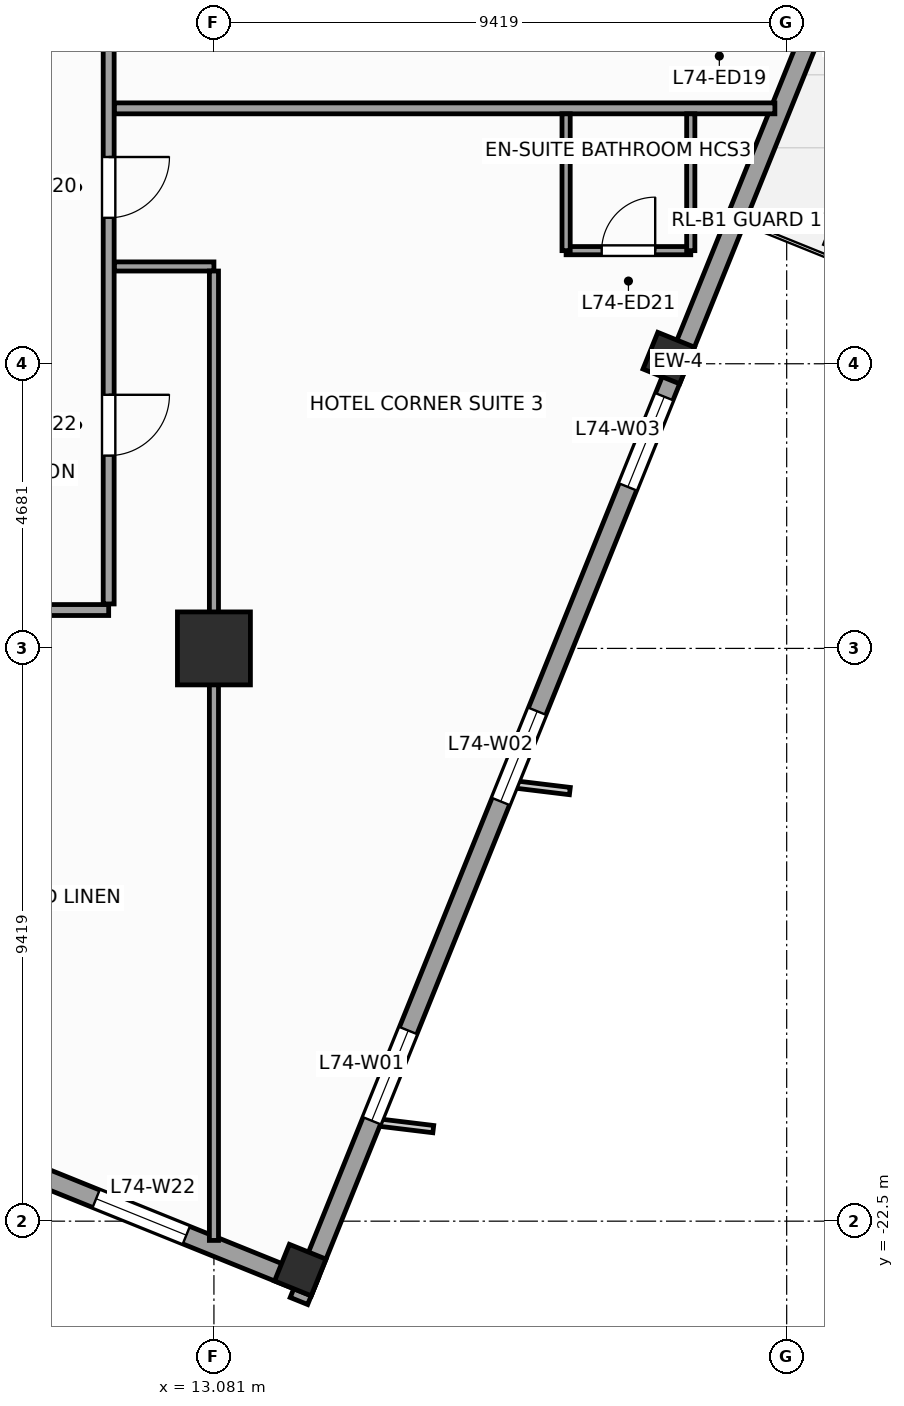
"""IFC4 building model, lengths in metres.
Left out: names, types, materials, properties, quantities, classifications, styles, units other than length and angle.
Written with IfcOpenShell. Run it as: python <this file> out.ifc"""

import sys

from ifc_helpers import new_model, si_unit, direction, frame, frame_2d, origin, origin_2d, place, context, subcontext, project, spatial, rectangle, extrude, source, transform, mapped, element, fill, save


model = new_model("IFC4")
c1 = context("Model", 3, precision=1e-05, world=origin(), true_north=direction((0.0, 1.0)))
c2 = subcontext(c1, "Body", "Model", "MODEL_VIEW")
j1 = project(units=[si_unit("LENGTHUNIT", "METRE"), si_unit("PLANEANGLEUNIT", "RADIAN")], contexts=[c1])
p1 = place(None, origin())
s1 = spatial("IfcSite", under=j1, at=p1, CompositionType="ELEMENT")
p2 = place(p1, origin())
s2 = spatial("IfcBuilding", under=s1, at=p2, CompositionType="ELEMENT")
p3 = place(p2, frame((0.0, 0.0, 301.2)))
s3 = spatial("IfcBuildingStorey", under=s2, at=p3, CompositionType="ELEMENT", Elevation=301.2)
m1 = source(origin(), c2, "Body", "SweptSolid", [
    extrude(rectangle(XDim=1.2, YDim=1.2, at=origin_2d()), origin(), (0.0, 0.0, 1.0), 3.6),
])
p4 = place(p3, frame((13.081, -13.081, 0.0), z_axis=(0.0, 0.0, 1.0), x_axis=(1.0, 0.0, 0.0)))
e1 = element("IfcColumn", 1, at=p4, inside=s3, PredefinedType="COLUMN", context=c2, shape_type="MappedRepresentation", body=[
    mapped(m1, transform((0.0, 0.0, 0.0), scale=1.0)),
])
m2 = source(origin(), c2, "Body", "SweptSolid", [
    extrude(rectangle(XDim=0.65, YDim=0.65, at=origin_2d()), origin(), (0.0, 0.0, 1.0), 3.6),
])
for number, where, z_axis, x_axis in (
    (2, (14.501, -23.304, 0.0), (0.0, 0.0, 1.0), (0.375, 0.927, 0.0)),
    (3, (20.56, -8.307, 0.0), (0.0, 0.0, 1.0), (0.375, 0.927, 0.0)),
):
    element("IfcColumn", number, at=place(p3, frame(where, z_axis=z_axis, x_axis=x_axis)), inside=s3, PredefinedType="COLUMN", context=c2, shape_type="MappedRepresentation", body=[
        mapped(m2, transform((0.0, 0.0, 0.0), scale=1.0)),
    ])
p5 = place(p3, frame((14.479, -23.813, 0.0), z_axis=(0.0, 0.0, 1.0), x_axis=(0.374609557019, 0.927182657188, 0.0)))
e4 = element("IfcWall", 4, at=p5, inside=s3, PredefinedType="STANDARD", context=c2, shape_type="SweptSolid", body=[
    extrude(rectangle(XDim=33.31, YDim=0.31, at=frame_2d((16.655, 0.0))), origin(), (0.0, 0.0, 1.0), 2.75),
])
p6 = place(p5, frame((23.08, 0.0, 0.0)))
e5 = element("IfcOpeningElement", 5, at=p6, cuts=e4, PredefinedType="OPENING", context=c2, shape_type="SweptSolid", body=[
    extrude(rectangle(XDim=1.05, YDim=2.25, at=frame_2d((0.525, 1.125))), frame((0.0, 0.165, 0.0), z_axis=(0.0, -1.0, 0.0), x_axis=(1.0, 0.0, 0.0)), (0.0, 0.0, 1.0), 0.33),
])
p7 = place(p5, frame((3.197, 0.0, 0.47)))
e6 = element("IfcOpeningElement", 6, at=p7, cuts=e4, PredefinedType="OPENING", context=c2, shape_type="SweptSolid", body=[
    extrude(rectangle(XDim=1.6, YDim=2.1, at=frame_2d((0.8, 1.05))), frame((0.0, 0.165, 0.0), z_axis=(0.0, -1.0, 0.0), x_axis=(1.0, 0.0, 0.0)), (0.0, 0.0, 1.0), 0.33),
])
p8 = place(p5, frame((8.86, 0.0, 0.47)))
e7 = element("IfcOpeningElement", 7, at=p8, cuts=e4, PredefinedType="OPENING", context=c2, shape_type="SweptSolid", body=[
    extrude(rectangle(XDim=1.6, YDim=2.1, at=frame_2d((0.8, 1.05))), frame((0.0, 0.165, 0.0), z_axis=(0.0, -1.0, 0.0), x_axis=(1.0, 0.0, 0.0)), (0.0, 0.0, 1.0), 0.33),
])
p9 = place(p5, frame((14.439, 0.0, 0.47)))
e8 = element("IfcOpeningElement", 8, at=p9, cuts=e4, PredefinedType="OPENING", context=c2, shape_type="SweptSolid", body=[
    extrude(rectangle(XDim=1.6, YDim=2.1, at=frame_2d((0.8, 1.05))), frame((0.0, 0.165, 0.0), z_axis=(0.0, -1.0, 0.0), x_axis=(1.0, 0.0, 0.0)), (0.0, 0.0, 1.0), 0.33),
])
p10 = place(p5, frame((30.097, 0.0, 0.47)))
e9 = element("IfcOpeningElement", 9, at=p10, cuts=e4, PredefinedType="OPENING", context=c2, shape_type="SweptSolid", body=[
    extrude(rectangle(XDim=1.6, YDim=2.1, at=frame_2d((0.8, 1.05))), frame((0.0, 0.165, 0.0), z_axis=(0.0, -1.0, 0.0), x_axis=(1.0, 0.0, 0.0)), (0.0, 0.0, 1.0), 0.33),
])
p11 = place(p5, frame((27.59, 0.0, 0.47)))
e10 = element("IfcOpeningElement", 10, at=p11, cuts=e4, PredefinedType="OPENING", context=c2, shape_type="SweptSolid", body=[
    extrude(rectangle(XDim=1.6, YDim=2.1, at=frame_2d((0.8, 1.05))), frame((0.0, 0.165, 0.0), z_axis=(0.0, -1.0, 0.0), x_axis=(1.0, 0.0, 0.0)), (0.0, 0.0, 1.0), 0.33),
])
p12 = place(p3, frame((9.032, -21.278, 0.0), z_axis=(0.0, 0.0, 1.0), x_axis=(0.927185411764, -0.374602739196, 0.0)))
e11 = element("IfcWall", 11, at=p12, inside=s3, PredefinedType="STANDARD", context=c2, shape_type="SweptSolid", body=[
    extrude(rectangle(XDim=6.155, YDim=0.31, at=frame_2d((3.078, 0.0))), origin(), (0.0, 0.0, 1.0), 3.35),
])
p13 = place(p12, frame((2.278, 0.0, 0.47)))
e12 = element("IfcOpeningElement", 12, at=p13, cuts=e11, PredefinedType="OPENING", context=c2, shape_type="SweptSolid", body=[
    extrude(rectangle(XDim=1.6, YDim=2.1, at=frame_2d((0.8, 1.05))), frame((0.0, 0.165, 0.0), z_axis=(0.0, -1.0, 0.0), x_axis=(1.0, 0.0, 0.0)), (0.0, 0.0, 1.0), 0.33),
])
p14 = place(p3, frame((-10.3, -12.45, 0.0), z_axis=(0.0, 0.0, 1.0), x_axis=(1.0, 0.0, 0.0)))
e13 = element("IfcWall", 13, at=p14, inside=s3, PredefinedType="PARTITIONING", context=c2, shape_type="SweptSolid", body=[
    extrude(rectangle(XDim=21.65, YDim=0.18, at=frame_2d((10.825, 0.0))), origin(), (0.0, 0.0, 1.0), 3.35),
])
p15 = place(p14, frame((14.786, 0.0, 0.0)))
e14 = element("IfcOpeningElement", 14, at=p15, cuts=e13, PredefinedType="OPENING", context=c2, shape_type="SweptSolid", body=[
    extrude(rectangle(XDim=0.95, YDim=2.1, at=frame_2d((0.475, 1.05))), frame((0.0, 0.1, 0.0), z_axis=(0.0, -1.0, 0.0), x_axis=(1.0, 0.0, 0.0)), (0.0, 0.0, 1.0), 0.2),
])
p16 = place(p14, frame((9.8, 0.0, 0.0)))
e15 = element("IfcOpeningElement", 15, at=p16, cuts=e13, PredefinedType="OPENING", context=c2, shape_type="SweptSolid", body=[
    extrude(rectangle(XDim=1.0, YDim=2.15, at=frame_2d((0.5, 1.075))), frame((0.0, 0.1, 0.0), z_axis=(0.0, -1.0, 0.0), x_axis=(1.0, 0.0, 0.0)), (0.0, 0.0, 1.0), 0.2),
])
p17 = place(p14, frame((3.064, 0.0, 0.0)))
e16 = element("IfcOpeningElement", 16, at=p17, cuts=e13, PredefinedType="OPENING", context=c2, shape_type="SweptSolid", body=[
    extrude(rectangle(XDim=1.0, YDim=2.15, at=frame_2d((0.5, 1.075))), frame((0.0, 0.1, 0.0), z_axis=(0.0, -1.0, 0.0), x_axis=(1.0, 0.0, 0.0)), (0.0, 0.0, 1.0), 0.2),
])
p18 = place(p3, frame((11.35, -12.35, 0.0), z_axis=(0.0, 0.0, 1.0), x_axis=(0.0, 1.0, 0.0)))
e17 = element("IfcWall", 17, at=p18, inside=s3, PredefinedType="PARTITIONING", context=c2, shape_type="SweptSolid", body=[
    extrude(rectangle(XDim=22.55, YDim=0.18, at=frame_2d((11.275, 0.0))), origin(), (0.0, 0.0, 1.0), 3.35),
])
p19 = place(p18, frame((17.15, 0.0, 0.0)))
e18 = element("IfcOpeningElement", 18, at=p19, cuts=e17, PredefinedType="OPENING", context=c2, shape_type="SweptSolid", body=[
    extrude(rectangle(XDim=1.0, YDim=2.15, at=frame_2d((0.5, 1.075))), frame((0.0, 0.1, 0.0), z_axis=(0.0, -1.0, 0.0), x_axis=(1.0, 0.0, 0.0)), (0.0, 0.0, 1.0), 0.2),
])
p20 = place(p18, frame((13.5, 0.0, 0.0)))
e19 = element("IfcOpeningElement", 19, at=p20, cuts=e17, PredefinedType="OPENING", context=c2, shape_type="SweptSolid", body=[
    extrude(rectangle(XDim=1.0, YDim=2.15, at=frame_2d((0.5, 1.075))), frame((0.0, 0.1, 0.0), z_axis=(0.0, -1.0, 0.0), x_axis=(1.0, 0.0, 0.0)), (0.0, 0.0, 1.0), 0.2),
])
p21 = place(p18, frame((9.5, 0.0, 0.0)))
e20 = element("IfcOpeningElement", 20, at=p21, cuts=e17, PredefinedType="OPENING", context=c2, shape_type="SweptSolid", body=[
    extrude(rectangle(XDim=1.0, YDim=2.15, at=frame_2d((0.5, 1.075))), frame((0.0, 0.1, 0.0), z_axis=(0.0, -1.0, 0.0), x_axis=(1.0, 0.0, 0.0)), (0.0, 0.0, 1.0), 0.2),
])
p22 = place(p18, frame((6.35, 0.0, 0.0)))
e21 = element("IfcOpeningElement", 21, at=p22, cuts=e17, PredefinedType="OPENING", context=c2, shape_type="SweptSolid", body=[
    extrude(rectangle(XDim=1.0, YDim=2.15, at=frame_2d((0.5, 1.075))), frame((0.0, 0.1, 0.0), z_axis=(0.0, -1.0, 0.0), x_axis=(1.0, 0.0, 0.0)), (0.0, 0.0, 1.0), 0.2),
])
p23 = place(p18, frame((2.439, 0.0, 0.0)))
e22 = element("IfcOpeningElement", 22, at=p23, cuts=e17, PredefinedType="OPENING", context=c2, shape_type="SweptSolid", body=[
    extrude(rectangle(XDim=1.0, YDim=2.15, at=frame_2d((0.5, 1.075))), frame((0.0, 0.1, 0.0), z_axis=(0.0, -1.0, 0.0), x_axis=(1.0, 0.0, 0.0)), (0.0, 0.0, 1.0), 0.2),
])
p24 = place(p3, frame((11.445, -4.2, 0.0), z_axis=(0.0, 0.0, 1.0), x_axis=(1.0, 0.0, 0.0)))
e23 = element("IfcWall", 23, at=p24, inside=s3, PredefinedType="PARTITIONING", context=c2, shape_type="SweptSolid", body=[
    extrude(rectangle(XDim=10.861, YDim=0.18, at=frame_2d((5.43, 0.0))), origin(), (0.0, 0.0, 1.0), 3.35),
])
p25 = place(p3, frame((11.445, -6.8, 0.0), z_axis=(0.0, 0.0, 1.0), x_axis=(1.0, 0.0, 0.0)))
e24 = element("IfcWall", 24, at=p25, inside=s3, PredefinedType="PARTITIONING", context=c2, shape_type="SweptSolid", body=[
    extrude(rectangle(XDim=1.636, YDim=0.15, at=frame_2d((0.818, 0.0))), origin(), (0.0, 0.0, 1.0), 3.35),
])
p26 = place(p3, frame((13.081, -6.875, 0.0), z_axis=(0.0, 0.0, 1.0), x_axis=(0.0, -1.0, 0.0)))
e25 = element("IfcWall", 25, at=p26, inside=s3, PredefinedType="PARTITIONING", context=c2, shape_type="SweptSolid", body=[
    extrude(rectangle(XDim=15.942, YDim=0.15, at=frame_2d((7.971, 0.0))), origin(), (0.0, 0.0, 1.0), 2.45),
])
p27 = place(p3, frame((18.873, -6.54, 0.0), z_axis=(0.0, 0.0, 1.0), x_axis=(1.0, 0.0, 0.0)))
e26 = element("IfcWall", 26, at=p27, inside=s3, PredefinedType="PARTITIONING", context=c2, shape_type="SweptSolid", body=[
    extrude(rectangle(XDim=2.05, YDim=0.135, at=frame_2d((1.025, 0.0))), origin(), (0.0, 0.0, 1.0), 3.35),
])
p28 = place(p27, frame((0.585, 0.0, 0.0)))
e27 = element("IfcOpeningElement", 27, at=p28, cuts=e26, PredefinedType="OPENING", context=c2, shape_type="SweptSolid", body=[
    extrude(rectangle(XDim=0.88, YDim=2.1, at=frame_2d((0.44, 1.05))), frame((0.0, 0.078, 0.0), z_axis=(0.0, -1.0, 0.0), x_axis=(1.0, 0.0, 0.0)), (0.0, 0.0, 1.0), 0.155),
])
for number, where, z_axis, x_axis in (
    (28, (20.923, -6.54, 0.0), (0.0, 0.0, 1.0), (0.0, 1.0, 0.0)),
    (29, (18.873, -6.54, 0.0), (0.0, 0.0, 1.0), (0.0, 1.0, 0.0)),
):
    element("IfcWall", number, at=place(p3, frame(where, z_axis=z_axis, x_axis=x_axis)), inside=s3, PredefinedType="PARTITIONING", context=c2, shape_type="SweptSolid", body=[
        extrude(rectangle(XDim=2.25, YDim=0.135, at=frame_2d((1.125, 0.0))), origin(), (0.0, 0.0, 1.0), 3.35),
    ])
m3 = source(origin(), c2, "Body", "SweptSolid", [
    extrude(rectangle(XDim=1.6, YDim=2.1, at=frame_2d((0.8, 1.05))), frame((0.0, 0.03, 0.0), z_axis=(0.0, -1.0, 0.0), x_axis=(1.0, 0.0, 0.0)), (0.0, 0.0, 1.0), 0.06),
])
p29 = place(p7, origin())
e30 = element("IfcWindow", 30, at=p29, inside=s3, PartitioningType="SINGLE_PANEL", PredefinedType="WINDOW", context=c2, shape_type="MappedRepresentation", body=[
    mapped(m3, transform((0.0, 0.0, 0.0), scale=1.0)),
])
fill(e6, e30)
p30 = place(p8, origin())
e31 = element("IfcWindow", 31, at=p30, inside=s3, PartitioningType="SINGLE_PANEL", PredefinedType="WINDOW", context=c2, shape_type="MappedRepresentation", body=[
    mapped(m3, transform((0.0, 0.0, 0.0), scale=1.0)),
])
fill(e7, e31)
p31 = place(p9, origin())
e32 = element("IfcWindow", 32, at=p31, inside=s3, PartitioningType="SINGLE_PANEL", PredefinedType="WINDOW", context=c2, shape_type="MappedRepresentation", body=[
    mapped(m3, transform((0.0, 0.0, 0.0), scale=1.0)),
])
fill(e8, e32)
p32 = place(p13, origin())
e33 = element("IfcWindow", 33, at=p32, inside=s3, PartitioningType="SINGLE_PANEL", PredefinedType="WINDOW", context=c2, shape_type="MappedRepresentation", body=[
    mapped(m3, transform((0.0, 0.0, 0.0), scale=1.0)),
])
fill(e12, e33)
m4 = source(origin(), c2, "Body", "SweptSolid", [
    extrude(rectangle(XDim=1.0, YDim=2.15, at=frame_2d((0.5, 1.075))), frame((0.0, 0.025, 0.0), z_axis=(0.0, -1.0, 0.0), x_axis=(1.0, 0.0, 0.0)), (0.0, 0.0, 1.0), 0.05),
])
p33 = place(p22, frame((1.0, 0.0, 0.0), z_axis=(0.0, 0.0, 1.0), x_axis=(-1.0, 0.0, 0.0)))
e34 = element("IfcDoor", 34, at=p33, inside=s3, OperationType="SINGLE_SWING_RIGHT", PredefinedType="DOOR", context=c2, shape_type="MappedRepresentation", body=[
    mapped(m4, transform((0.0, 0.0, 0.0), scale=1.0)),
])
fill(e21, e34)
m5 = source(origin(), c2, "Body", "SweptSolid", [
    extrude(rectangle(XDim=0.88, YDim=2.1, at=frame_2d((0.44, 1.05))), frame((0.0, 0.025, 0.0), z_axis=(0.0, -1.0, 0.0), x_axis=(1.0, 0.0, 0.0)), (0.0, 0.0, 1.0), 0.05),
])
p34 = place(p28, origin())
e35 = element("IfcDoor", 35, at=p34, inside=s3, OperationType="SINGLE_SWING_RIGHT", PredefinedType="DOOR", context=c2, shape_type="MappedRepresentation", body=[
    mapped(m5, transform((0.0, 0.0, 0.0), scale=1.0)),
])
fill(e27, e35)
p35 = place(p23, frame((1.0, 0.0, 0.0), z_axis=(0.0, 0.0, 1.0), x_axis=(-1.0, 0.0, 0.0)))
e36 = element("IfcDoor", 36, at=p35, inside=s3, OperationType="SINGLE_SWING_RIGHT", PredefinedType="DOOR", context=c2, shape_type="MappedRepresentation", body=[
    mapped(m4, transform((0.0, 0.0, 0.0), scale=1.0)),
])
fill(e22, e36)
save(model, sys.argv[1])
